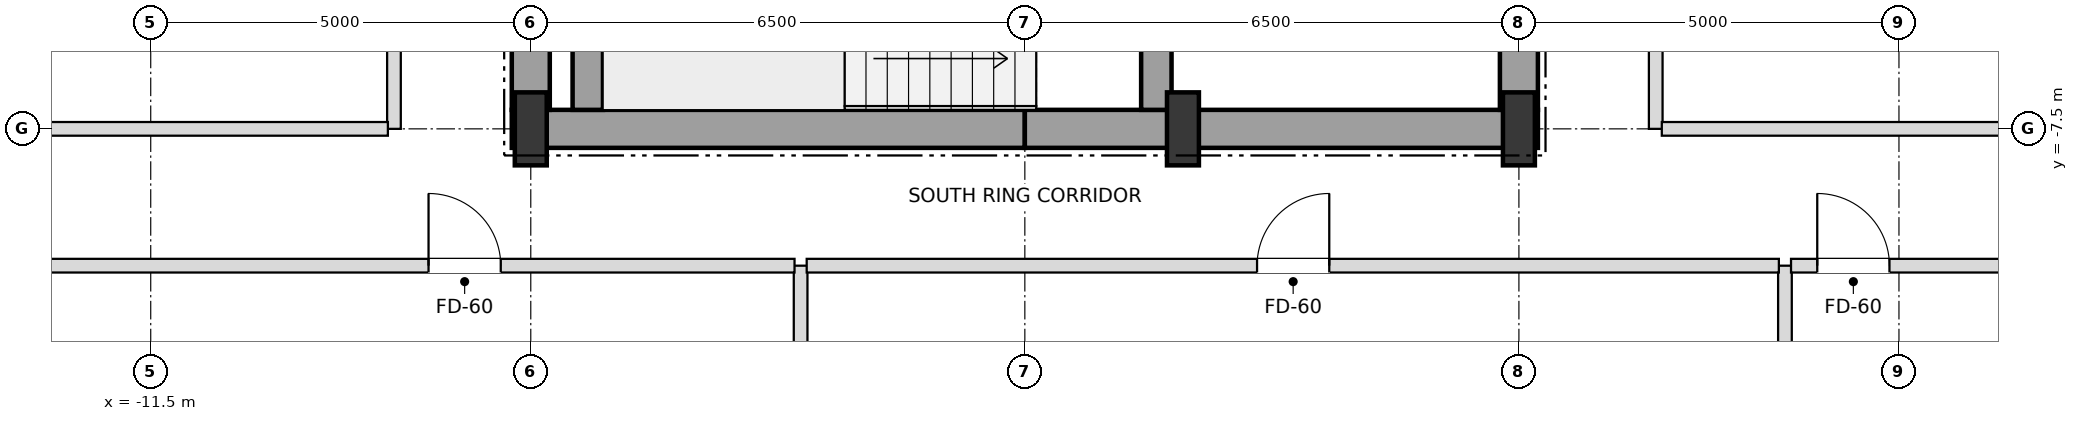
"""IFC4 building model, lengths in metres.
Left out: names, types, materials, properties, quantities, classifications, styles, units other than length and angle.
Written with IfcOpenShell. Run it as: python <this file> out.ifc"""

import sys

from ifc_helpers import new_model, si_unit, direction, frame, frame_2d, origin, origin_2d, place, context, subcontext, project, spatial, rectangle, i_section, extrude, element, fill, save


model = new_model("IFC4")
c1 = context("Model", 3, precision=1e-05, world=origin(), true_north=direction((0.0, 1.0)))
c2 = subcontext(c1, "Body", "Model", "MODEL_VIEW")
j1 = project(units=[si_unit("LENGTHUNIT", "METRE"), si_unit("PLANEANGLEUNIT", "RADIAN")], contexts=[c1])
p1 = place(None, origin())
s1 = spatial("IfcSite", under=j1, at=p1, CompositionType="ELEMENT")
p2 = place(p1, origin())
s2 = spatial("IfcBuilding", under=s1, at=p2, CompositionType="ELEMENT")
p3 = place(p2, frame((0.0, 0.0, 86.4)))
s3 = spatial("IfcBuildingStorey", under=s2, at=p3, CompositionType="ELEMENT", Elevation=86.4)
for number, where, z_axis, x_axis in (
    (1, (-6.5, -7.5, 0.0), (0.0, 0.0, 1.0), (1.0, 0.0, 0.0)),
    (2, (2.08, -7.5, 0.0), (0.0, 0.0, 1.0), (1.0, 0.0, 0.0)),
    (3, (6.5, -7.5, 0.0), (0.0, 0.0, 1.0), (1.0, 0.0, 0.0)),
):
    element("IfcColumn", number, at=place(p3, frame(where, z_axis=z_axis, x_axis=x_axis)), inside=s3, PredefinedType="COLUMN", context=c2, shape_type="SweptSolid", body=[
        extrude(i_section(OverallWidth=0.42, OverallDepth=0.96, WebThickness=0.022, FlangeThickness=0.034, at=origin_2d()), origin(), (0.0, 0.0, 1.0), 3.6),
    ])
for number, where, z_axis, x_axis in (
    (4, (-6.75, -7.5, 0.0), (0.0, 0.0, 1.0), (1.0, 0.0, 0.0)),
    (5, (0.0, -7.5, 0.0), (0.0, 0.0, 1.0), (1.0, 0.0, 0.0)),
):
    element("IfcWall", number, at=place(p3, frame(where, z_axis=z_axis, x_axis=x_axis)), inside=s3, PredefinedType="SHEAR", context=c2, shape_type="SweptSolid", body=[
        extrude(rectangle(XDim=6.75, YDim=0.5, at=frame_2d((3.375, 0.0))), origin(), (0.0, 0.0, 1.0), 3.38),
    ])
p4 = place(p3, frame((-6.5, -7.25, 0.0), z_axis=(0.0, 0.0, 1.0), x_axis=(0.0, 1.0, 0.0)))
e6 = element("IfcWall", 6, at=p4, inside=s3, PredefinedType="SHEAR", context=c2, shape_type="SweptSolid", body=[
    extrude(rectangle(XDim=3.55, YDim=0.5, at=frame_2d((1.775, 0.0))), origin(), (0.0, 0.0, 1.0), 3.38),
])
p5 = place(p3, frame((6.5, -7.25, 0.0), z_axis=(0.0, 0.0, 1.0), x_axis=(0.0, 1.0, 0.0)))
e7 = element("IfcWall", 7, at=p5, inside=s3, PredefinedType="SHEAR", context=c2, shape_type="SweptSolid", body=[
    extrude(rectangle(XDim=5.75, YDim=0.5, at=frame_2d((2.875, 0.0))), origin(), (0.0, 0.0, 1.0), 3.38),
])
p6 = place(p5, frame((0.85, 0.0, 0.0)))
e8 = element("IfcOpeningElement", 8, at=p6, cuts=e7, PredefinedType="OPENING", context=c2, shape_type="SweptSolid", body=[
    extrude(rectangle(XDim=1.05, YDim=2.15, at=frame_2d((0.525, 1.075))), frame((0.0, 0.26, 0.0), z_axis=(0.0, -1.0, 0.0), x_axis=(1.0, 0.0, 0.0)), (0.0, 0.0, 1.0), 0.52),
])
p7 = place(p3, frame((-5.75, -7.25, 0.0), z_axis=(0.0, 0.0, 1.0), x_axis=(0.0, 1.0, 0.0)))
e9 = element("IfcWall", 9, at=p7, inside=s3, PredefinedType="SHEAR", context=c2, shape_type="SweptSolid", body=[
    extrude(rectangle(XDim=2.9, YDim=0.4, at=frame_2d((1.45, 0.0))), origin(), (0.0, 0.0, 1.0), 3.38),
])
p8 = place(p3, frame((1.73, -7.25, 0.0), z_axis=(0.0, 0.0, 1.0), x_axis=(0.0, 1.0, 0.0)))
e10 = element("IfcWall", 10, at=p8, inside=s3, PredefinedType="SHEAR", context=c2, shape_type="SweptSolid", body=[
    extrude(rectangle(XDim=3.3, YDim=0.4, at=frame_2d((1.65, 0.0))), origin(), (0.0, 0.0, 1.0), 3.38),
])
p9 = place(p8, frame((0.9, 0.0, 0.0)))
e11 = element("IfcOpeningElement", 11, at=p9, cuts=e10, PredefinedType="OPENING", context=c2, shape_type="SweptSolid", body=[
    extrude(rectangle(XDim=1.05, YDim=2.15, at=frame_2d((0.525, 1.075))), frame((0.0, 0.21, 0.0), z_axis=(0.0, -1.0, 0.0), x_axis=(1.0, 0.0, 0.0)), (0.0, 0.0, 1.0), 0.42),
])
p10 = place(p3, frame((-8.3, -7.5, 0.0), z_axis=(0.0, 0.0, 1.0), x_axis=(0.0, 1.0, 0.0)))
e12 = element("IfcWall", 12, at=p10, inside=s3, PredefinedType="PARTITIONING", context=c2, shape_type="SweptSolid", body=[
    extrude(rectangle(XDim=15.0, YDim=0.18, at=frame_2d((7.5, 0.0))), origin(), (0.0, 0.0, 1.0), 3.38),
])
p11 = place(p10, frame((2.075, 0.0, 0.0)))
e13 = element("IfcOpeningElement", 13, at=p11, cuts=e12, PredefinedType="OPENING", context=c2, shape_type="SweptSolid", body=[
    extrude(rectangle(XDim=0.95, YDim=2.15, at=frame_2d((0.475, 1.075))), frame((0.0, 0.1, 0.0), z_axis=(0.0, -1.0, 0.0), x_axis=(1.0, 0.0, 0.0)), (0.0, 0.0, 1.0), 0.2),
])
p12 = place(p10, frame((8.475, 0.0, 0.0)))
e14 = element("IfcOpeningElement", 14, at=p12, cuts=e12, PredefinedType="OPENING", context=c2, shape_type="SweptSolid", body=[
    extrude(rectangle(XDim=0.95, YDim=2.15, at=frame_2d((0.475, 1.075))), frame((0.0, 0.1, 0.0), z_axis=(0.0, -1.0, 0.0), x_axis=(1.0, 0.0, 0.0)), (0.0, 0.0, 1.0), 0.2),
])
p13 = place(p10, frame((13.425, 0.0, 0.0)))
e15 = element("IfcOpeningElement", 15, at=p13, cuts=e12, PredefinedType="OPENING", context=c2, shape_type="SweptSolid", body=[
    extrude(rectangle(XDim=0.95, YDim=2.15, at=frame_2d((0.475, 1.075))), frame((0.0, 0.1, 0.0), z_axis=(0.0, -1.0, 0.0), x_axis=(1.0, 0.0, 0.0)), (0.0, 0.0, 1.0), 0.2),
])
p14 = place(p3, frame((-2.95, -24.9, 0.0), z_axis=(0.0, 0.0, 1.0), x_axis=(0.0, 1.0, 0.0)))
e16 = element("IfcWall", 16, at=p14, inside=s3, PredefinedType="PARTITIONING", context=c2, shape_type="SweptSolid", body=[
    extrude(rectangle(XDim=15.6, YDim=0.18, at=frame_2d((7.8, 0.0))), origin(), (0.0, 0.0, 1.0), 2.816),
])
p15 = place(p3, frame((8.3, -7.5, 0.0), z_axis=(0.0, 0.0, 1.0), x_axis=(0.0, 1.0, 0.0)))
e17 = element("IfcWall", 17, at=p15, inside=s3, PredefinedType="PARTITIONING", context=c2, shape_type="SweptSolid", body=[
    extrude(rectangle(XDim=15.0, YDim=0.18, at=frame_2d((7.5, 0.0))), origin(), (0.0, 0.0, 1.0), 3.38),
])
p16 = place(p15, frame((2.075, 0.0, 0.0)))
e18 = element("IfcOpeningElement", 18, at=p16, cuts=e17, PredefinedType="OPENING", context=c2, shape_type="SweptSolid", body=[
    extrude(rectangle(XDim=0.95, YDim=2.15, at=frame_2d((0.475, 1.075))), frame((0.0, 0.1, 0.0), z_axis=(0.0, -1.0, 0.0), x_axis=(1.0, 0.0, 0.0)), (0.0, 0.0, 1.0), 0.2),
])
p17 = place(p15, frame((8.475, 0.0, 0.0)))
e19 = element("IfcOpeningElement", 19, at=p17, cuts=e17, PredefinedType="OPENING", context=c2, shape_type="SweptSolid", body=[
    extrude(rectangle(XDim=0.95, YDim=2.15, at=frame_2d((0.475, 1.075))), frame((0.0, 0.1, 0.0), z_axis=(0.0, -1.0, 0.0), x_axis=(1.0, 0.0, 0.0)), (0.0, 0.0, 1.0), 0.2),
])
p18 = place(p15, frame((13.425, 0.0, 0.0)))
e20 = element("IfcOpeningElement", 20, at=p18, cuts=e17, PredefinedType="OPENING", context=c2, shape_type="SweptSolid", body=[
    extrude(rectangle(XDim=0.95, YDim=2.15, at=frame_2d((0.475, 1.075))), frame((0.0, 0.1, 0.0), z_axis=(0.0, -1.0, 0.0), x_axis=(1.0, 0.0, 0.0)), (0.0, 0.0, 1.0), 0.2),
])
p19 = place(p3, frame((10.0, -24.9, 0.0), z_axis=(0.0, 0.0, 1.0), x_axis=(0.0, 1.0, 0.0)))
e21 = element("IfcWall", 21, at=p19, inside=s3, PredefinedType="PARTITIONING", context=c2, shape_type="SweptSolid", body=[
    extrude(rectangle(XDim=15.6, YDim=0.18, at=frame_2d((7.8, 0.0))), origin(), (0.0, 0.0, 1.0), 2.816),
])
p20 = place(p19, frame((6.015, 0.0, 0.0)))
e22 = element("IfcOpeningElement", 22, at=p20, cuts=e21, PredefinedType="OPENING", context=c2, shape_type="SweptSolid", body=[
    extrude(rectangle(XDim=0.95, YDim=2.15, at=frame_2d((0.475, 1.075))), frame((0.0, 0.1, 0.0), z_axis=(0.0, -1.0, 0.0), x_axis=(1.0, 0.0, 0.0)), (0.0, 0.0, 1.0), 0.2),
])
p21 = place(p3, frame((-18.4, -9.3, 0.0), z_axis=(0.0, 0.0, 1.0), x_axis=(1.0, 0.0, 0.0)))
e23 = element("IfcWall", 23, at=p21, inside=s3, PredefinedType="PARTITIONING", context=c2, shape_type="SweptSolid", body=[
    extrude(rectangle(XDim=15.37, YDim=0.18, at=frame_2d((7.685, 0.0))), origin(), (0.0, 0.0, 1.0), 2.816),
])
p22 = place(p21, frame((10.555, 0.0, 0.0)))
e24 = element("IfcOpeningElement", 24, at=p22, cuts=e23, PredefinedType="OPENING", context=c2, shape_type="SweptSolid", body=[
    extrude(rectangle(XDim=0.95, YDim=2.15, at=frame_2d((0.475, 1.075))), frame((0.0, 0.1, 0.0), z_axis=(0.0, -1.0, 0.0), x_axis=(1.0, 0.0, 0.0)), (0.0, 0.0, 1.0), 0.2),
])
p23 = place(p3, frame((-2.87, -9.3, 0.0), z_axis=(0.0, 0.0, 1.0), x_axis=(1.0, 0.0, 0.0)))
e25 = element("IfcWall", 25, at=p23, inside=s3, PredefinedType="PARTITIONING", context=c2, shape_type="SweptSolid", body=[
    extrude(rectangle(XDim=12.79, YDim=0.18, at=frame_2d((6.395, 0.0))), origin(), (0.0, 0.0, 1.0), 2.816),
])
p24 = place(p23, frame((5.925, 0.0, 0.0)))
e26 = element("IfcOpeningElement", 26, at=p24, cuts=e25, PredefinedType="OPENING", context=c2, shape_type="SweptSolid", body=[
    extrude(rectangle(XDim=0.95, YDim=2.15, at=frame_2d((0.475, 1.075))), frame((0.0, 0.1, 0.0), z_axis=(0.0, -1.0, 0.0), x_axis=(1.0, 0.0, 0.0)), (0.0, 0.0, 1.0), 0.2),
])
p25 = place(p3, frame((10.08, -9.3, 0.0), z_axis=(0.0, 0.0, 1.0), x_axis=(1.0, 0.0, 0.0)))
e27 = element("IfcWall", 27, at=p25, inside=s3, PredefinedType="PARTITIONING", context=c2, shape_type="SweptSolid", body=[
    extrude(rectangle(XDim=8.24, YDim=0.18, at=frame_2d((4.12, 0.0))), origin(), (0.0, 0.0, 1.0), 2.816),
])
p26 = place(p25, frame((0.345, 0.0, 0.0)))
e28 = element("IfcOpeningElement", 28, at=p26, cuts=e27, PredefinedType="OPENING", context=c2, shape_type="SweptSolid", body=[
    extrude(rectangle(XDim=0.95, YDim=2.15, at=frame_2d((0.475, 1.075))), frame((0.0, 0.1, 0.0), z_axis=(0.0, -1.0, 0.0), x_axis=(1.0, 0.0, 0.0)), (0.0, 0.0, 1.0), 0.2),
])
for number, where, z_axis, x_axis in (
    (29, (-21.9, -7.5, 0.0), (0.0, 0.0, 1.0), (1.0, 0.0, 0.0)),
    (30, (8.38, -7.5, 0.0), (0.0, 0.0, 1.0), (1.0, 0.0, 0.0)),
):
    element("IfcWall", number, at=place(p3, frame(where, z_axis=z_axis, x_axis=x_axis)), inside=s3, PredefinedType="PARTITIONING", context=c2, shape_type="SweptSolid", body=[
        extrude(rectangle(XDim=13.52, YDim=0.18, at=frame_2d((6.76, 0.0))), origin(), (0.0, 0.0, 1.0), 2.816),
    ])
p27 = place(p26, origin())
e31 = element("IfcDoor", 31, at=p27, inside=s3, OperationType="SINGLE_SWING_LEFT", PredefinedType="DOOR", context=c2, shape_type="SweptSolid", body=[
    extrude(rectangle(XDim=0.95, YDim=2.15, at=frame_2d((0.475, 1.075))), frame((0.0, 0.025, 0.0), z_axis=(0.0, -1.0, 0.0), x_axis=(1.0, 0.0, 0.0)), (0.0, 0.0, 1.0), 0.05),
])
fill(e28, e31)
p28 = place(p22, origin())
e32 = element("IfcDoor", 32, at=p28, inside=s3, OperationType="SINGLE_SWING_LEFT", PredefinedType="DOOR", context=c2, shape_type="SweptSolid", body=[
    extrude(rectangle(XDim=0.95, YDim=2.15, at=frame_2d((0.475, 1.075))), frame((0.0, 0.025, 0.0), z_axis=(0.0, -1.0, 0.0), x_axis=(1.0, 0.0, 0.0)), (0.0, 0.0, 1.0), 0.05),
])
fill(e24, e32)
p29 = place(p24, origin())
e33 = element("IfcDoor", 33, at=p29, inside=s3, OperationType="SINGLE_SWING_RIGHT", PredefinedType="DOOR", context=c2, shape_type="SweptSolid", body=[
    extrude(rectangle(XDim=0.95, YDim=2.15, at=frame_2d((0.475, 1.075))), frame((0.0, 0.025, 0.0), z_axis=(0.0, -1.0, 0.0), x_axis=(1.0, 0.0, 0.0)), (0.0, 0.0, 1.0), 0.05),
])
fill(e26, e33)
save(model, sys.argv[1])
